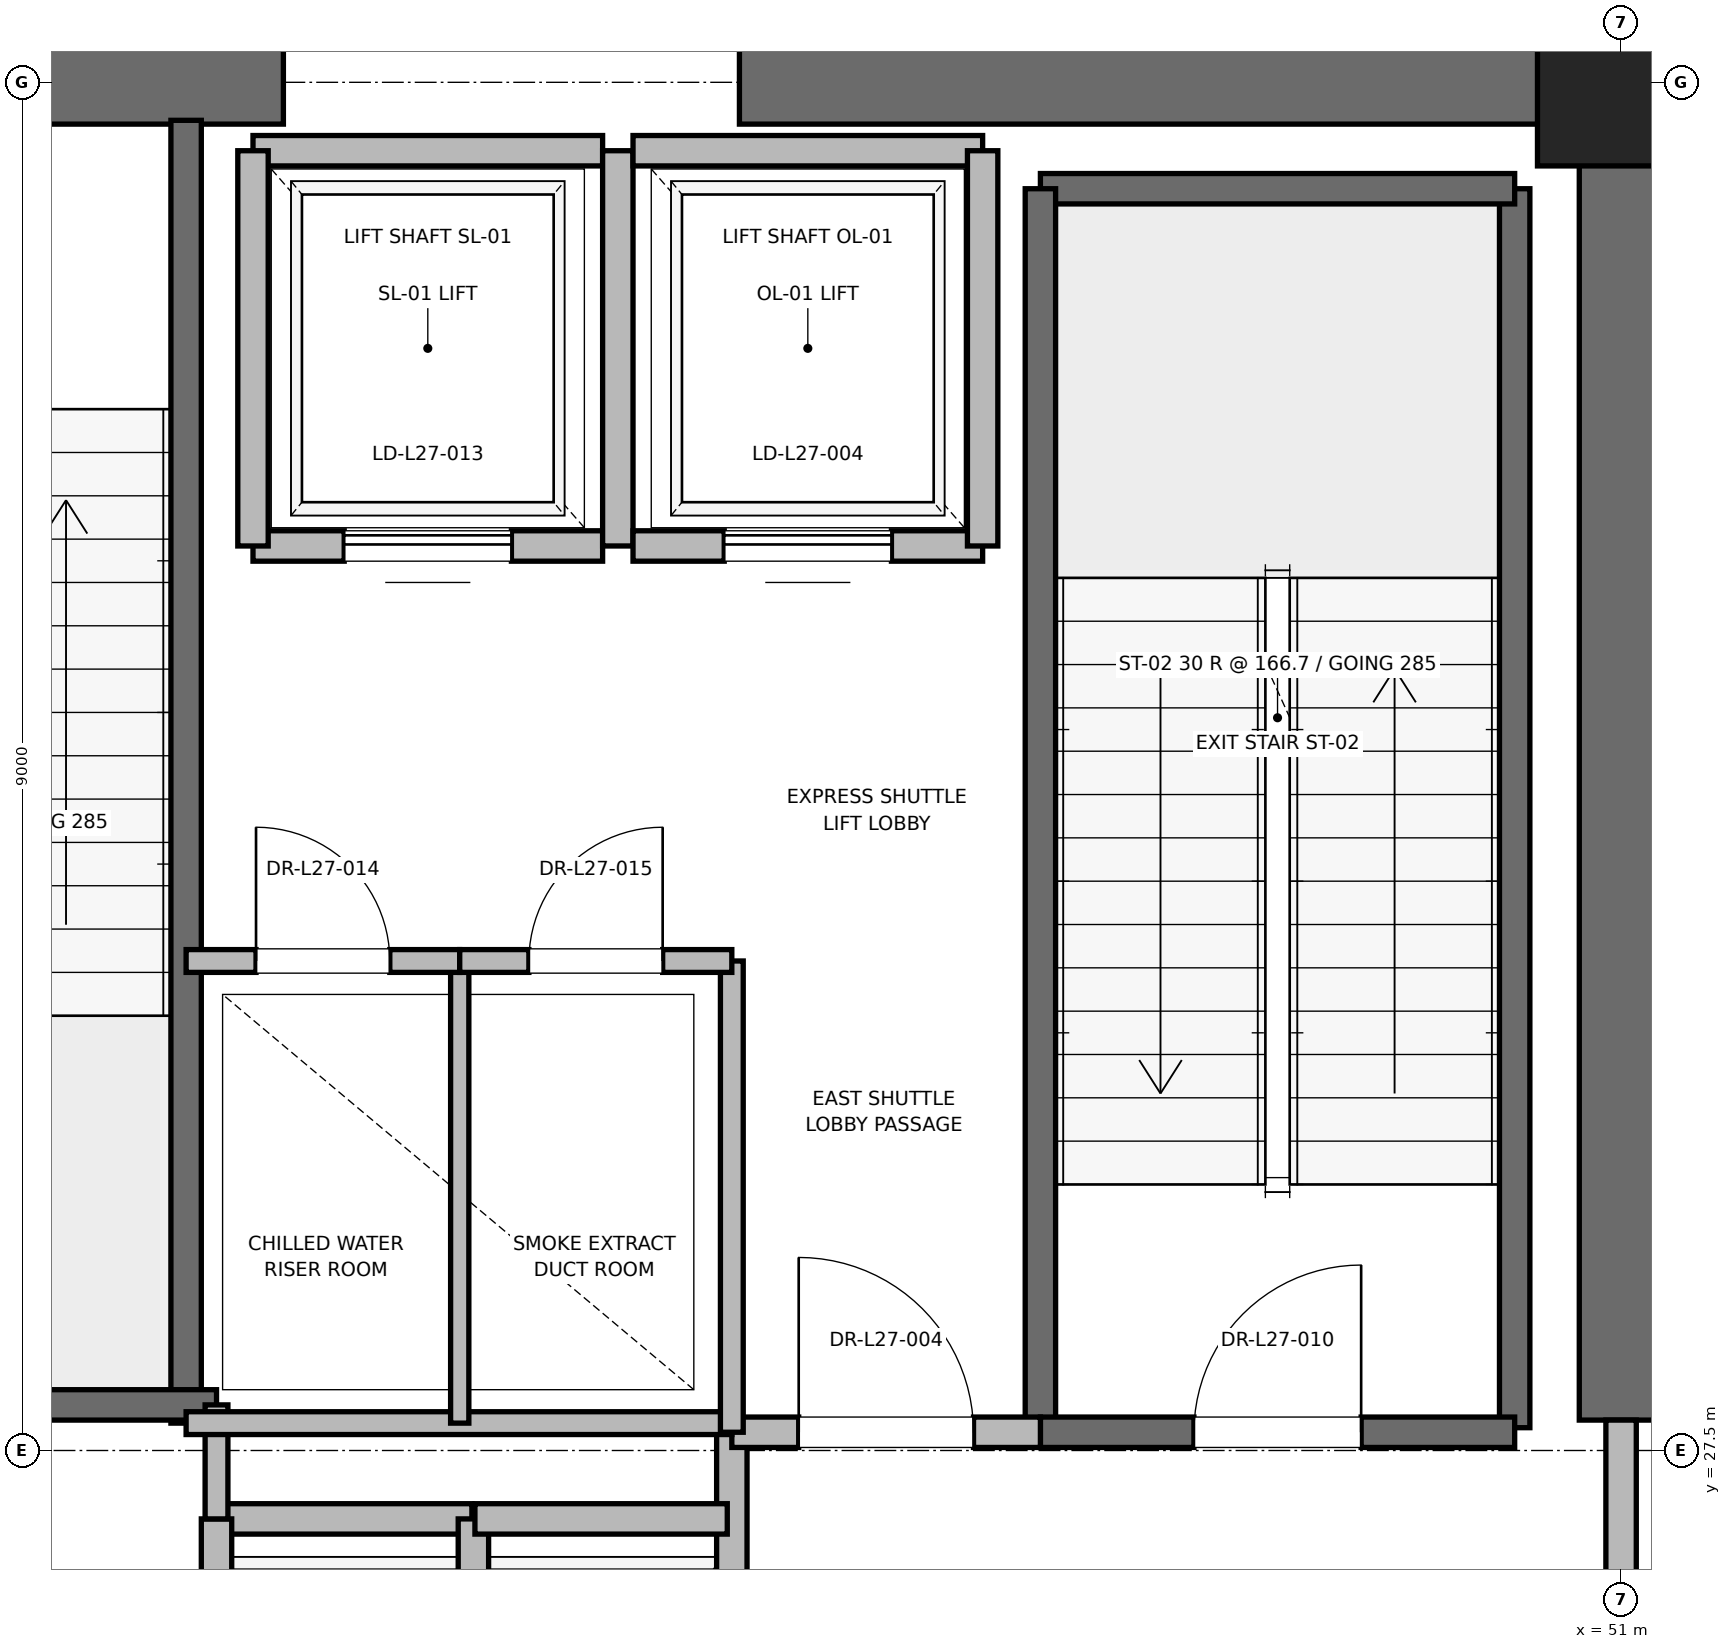
"""IFC4 building model, lengths in metres.
Left out: names, types, materials, properties, quantities, classifications, styles, units other than length and angle.
Written with IfcOpenShell. Run it as: python <this file> out.ifc"""

import sys

from ifc_helpers import new_model, si_unit, direction, frame, frame_2d, origin, origin_2d, place, context, subcontext, project, spatial, rectangle, extrude, element, fill, save


model = new_model("IFC4")
c1 = context("Model", 3, precision=1e-05, world=origin(), true_north=direction((0.0, 1.0)))
c2 = subcontext(c1, "Body", "Model", "MODEL_VIEW")
j1 = project(units=[si_unit("LENGTHUNIT", "METRE"), si_unit("PLANEANGLEUNIT", "RADIAN")], contexts=[c1])
p1 = place(None, origin())
s1 = spatial("IfcSite", under=j1, at=p1, CompositionType="ELEMENT")
p2 = place(p1, origin())
s2 = spatial("IfcBuilding", under=s1, at=p2, CompositionType="ELEMENT")
p3 = place(p2, frame((0.0, 0.0, 118.4)))
s3 = spatial("IfcBuildingStorey", under=s2, at=p3, CompositionType="ELEMENT", Elevation=118.4)
p4 = place(p3, frame((51.0, 36.5, 0.0), z_axis=(0.0, 0.0, 1.0), x_axis=(1.0, 0.0, 0.0)))
e1 = element("IfcColumn", 1, at=p4, inside=s3, PredefinedType="PILASTER", context=c2, shape_type="SweptSolid", body=[
    extrude(rectangle(XDim=1.1, YDim=1.1, at=origin_2d()), origin(), (0.0, 0.0, 1.0), 5.0),
])
p5 = place(p3, frame((37.8, 36.5, 0.0), z_axis=(0.0, 0.0, 1.0), x_axis=(1.0, 0.0, 0.0)))
e2 = element("IfcWall", 2, at=p5, inside=s3, PredefinedType="SHEAR", context=c2, shape_type="SweptSolid", body=[
    extrude(rectangle(XDim=4.4, YDim=0.55, at=frame_2d((2.2, 0.0))), origin(), (0.0, 0.0, 1.0), 4.7),
])
p6 = place(p5, frame((1.65, 0.0, 0.0)))
e3 = element("IfcOpeningElement", 3, at=p6, cuts=e2, PredefinedType="OPENING", context=c2, shape_type="SweptSolid", body=[
    extrude(rectangle(XDim=1.1, YDim=2.15, at=frame_2d((0.55, 1.075))), frame((0.0, 0.275, 0.0), z_axis=(0.0, -1.0, 0.0), x_axis=(1.0, 0.0, 0.0)), (0.0, 0.0, 1.0), 0.55),
])
p7 = place(p3, frame((45.2, 36.5, 0.0), z_axis=(0.0, 0.0, 1.0), x_axis=(1.0, 0.0, 0.0)))
e4 = element("IfcWall", 4, at=p7, inside=s3, PredefinedType="SHEAR", context=c2, shape_type="SweptSolid", body=[
    extrude(rectangle(XDim=5.8, YDim=0.55, at=frame_2d((2.9, 0.0))), origin(), (0.0, 0.0, 1.0), 4.7),
])
p8 = place(p3, frame((51.0, 27.7, 0.0), z_axis=(0.0, 0.0, 1.0), x_axis=(0.0, 1.0, 0.0)))
e5 = element("IfcWall", 5, at=p8, inside=s3, PredefinedType="SHEAR", context=c2, shape_type="SweptSolid", body=[
    extrude(rectangle(XDim=8.8, YDim=0.55, at=frame_2d((4.4, 0.0))), origin(), (0.0, 0.0, 1.0), 4.7),
])
p9 = place(p3, frame((50.3, 27.65, 0.0), z_axis=(0.0, 0.0, 1.0), x_axis=(0.0, 1.0, 0.0)))
e6 = element("IfcWall", 6, at=p9, inside=s3, PredefinedType="SOLIDWALL", context=c2, shape_type="SweptSolid", body=[
    extrude(rectangle(XDim=8.15, YDim=0.2, at=frame_2d((4.075, 0.0))), origin(), (0.0, 0.0, 1.0), 4.7),
])
p10 = place(p3, frame((47.18, 35.8, 0.0), z_axis=(0.0, 0.0, 1.0), x_axis=(1.0, 0.0, 0.0)))
e7 = element("IfcWall", 7, at=p10, inside=s3, PredefinedType="SOLIDWALL", context=c2, shape_type="SweptSolid", body=[
    extrude(rectangle(XDim=3.12, YDim=0.2, at=frame_2d((1.56, 0.0))), origin(), (0.0, 0.0, 1.0), 4.7),
])
p11 = place(p3, frame((47.18, 27.62, 0.0), z_axis=(0.0, 0.0, 1.0), x_axis=(0.0, 1.0, 0.0)))
e8 = element("IfcWall", 8, at=p11, inside=s3, PredefinedType="SOLIDWALL", context=c2, shape_type="SweptSolid", body=[
    extrude(rectangle(XDim=8.18, YDim=0.2, at=frame_2d((4.09, 0.0))), origin(), (0.0, 0.0, 1.0), 4.7),
])
p12 = place(p3, frame((47.18, 27.62, 0.0), z_axis=(0.0, 0.0, 1.0), x_axis=(1.0, 0.0, 0.0)))
e9 = element("IfcWall", 9, at=p12, inside=s3, PredefinedType="SOLIDWALL", context=c2, shape_type="SweptSolid", body=[
    extrude(rectangle(XDim=3.12, YDim=0.2, at=frame_2d((1.56, 0.0))), origin(), (0.0, 0.0, 1.0), 4.7),
])
p13 = place(p12, frame((1.01, 0.0, 0.0)))
e10 = element("IfcOpeningElement", 10, at=p13, cuts=e9, PredefinedType="OPENING", context=c2, shape_type="SweptSolid", body=[
    extrude(rectangle(XDim=1.1, YDim=2.15, at=frame_2d((0.55, 1.075))), frame((0.0, 0.1, 0.0), z_axis=(0.0, -1.0, 0.0), x_axis=(1.0, 0.0, 0.0)), (0.0, 0.0, 1.0), 0.2),
])
p14 = place(p3, frame((41.56, 27.68, 0.0), z_axis=(0.0, 0.0, 1.0), x_axis=(0.0, 1.0, 0.0)))
e11 = element("IfcWall", 11, at=p14, inside=s3, PredefinedType="SOLIDWALL", context=c2, shape_type="SweptSolid", body=[
    extrude(rectangle(XDim=8.57, YDim=0.2, at=frame_2d((4.285, 0.0))), origin(), (0.0, 0.0, 1.0), 4.7),
])
p15 = place(p3, frame((38.44, 27.8, 0.0), z_axis=(0.0, 0.0, 1.0), x_axis=(1.0, 0.0, 0.0)))
e12 = element("IfcWall", 12, at=p15, inside=s3, PredefinedType="SOLIDWALL", context=c2, shape_type="SweptSolid", body=[
    extrude(rectangle(XDim=3.32, YDim=0.2, at=frame_2d((1.66, 0.0))), origin(), (0.0, 0.0, 1.0), 4.7),
])
p16 = place(p3, frame((45.15, 24.25, 0.0), z_axis=(0.0, 0.0, 1.0), x_axis=(0.0, 1.0, 0.0)))
e13 = element("IfcWall", 13, at=p16, inside=s3, PredefinedType="PARTITIONING", context=c2, shape_type="SweptSolid", body=[
    extrude(rectangle(XDim=3.37, YDim=0.2, at=frame_2d((1.685, 0.0))), origin(), (0.0, 0.0, 1.0), 4.7),
])
p17 = place(p3, frame((45.15, 27.62, 0.0), z_axis=(0.0, 0.0, 1.0), x_axis=(1.0, 0.0, 0.0)))
e14 = element("IfcWall", 14, at=p17, inside=s3, PredefinedType="PARTITIONING", context=c2, shape_type="SweptSolid", body=[
    extrude(rectangle(XDim=2.03, YDim=0.2, at=frame_2d((1.015, 0.0))), origin(), (0.0, 0.0, 1.0), 4.7),
])
p18 = place(p17, frame((0.44, 0.0, 0.0)))
e15 = element("IfcOpeningElement", 15, at=p18, cuts=e14, PredefinedType="OPENING", context=c2, shape_type="SweptSolid", body=[
    extrude(rectangle(XDim=1.15, YDim=2.2, at=frame_2d((0.575, 1.1))), frame((0.0, 0.1, 0.0), z_axis=(0.0, -1.0, 0.0), x_axis=(1.0, 0.0, 0.0)), (0.0, 0.0, 1.0), 0.2),
])
p19 = place(p3, frame((51.0, 24.3, 0.0), z_axis=(0.0, 0.0, 1.0), x_axis=(0.0, 1.0, 0.0)))
e16 = element("IfcWall", 16, at=p19, inside=s3, PredefinedType="PARTITIONING", context=c2, shape_type="SweptSolid", body=[
    extrude(rectangle(XDim=3.4, YDim=0.2, at=frame_2d((1.7, 0.0))), origin(), (0.0, 0.0, 1.0), 3.68),
])
p20 = place(p19, frame((1.125, 0.0, 0.0)))
e17 = element("IfcOpeningElement", 17, at=p20, cuts=e16, PredefinedType="OPENING", context=c2, shape_type="SweptSolid", body=[
    extrude(rectangle(XDim=1.15, YDim=2.2, at=frame_2d((0.575, 1.1))), frame((0.0, 0.1, 0.0), z_axis=(0.0, -1.0, 0.0), x_axis=(1.0, 0.0, 0.0)), (0.0, 0.0, 1.0), 0.2),
])
p21 = place(p3, frame((43.44, 27.05, 0.0), z_axis=(0.0, 0.0, 1.0), x_axis=(-1.0, 0.0, 0.0)))
e18 = element("IfcWall", 18, at=p21, inside=s3, PredefinedType="SOLIDWALL", context=c2, shape_type="SweptSolid", body=[
    extrude(rectangle(XDim=1.68, YDim=0.2, at=frame_2d((0.84, 0.0))), origin(), (0.0, 0.0, 1.0), 4.7),
])
for number, where, z_axis, x_axis in (
    (19, (41.76, 27.05, 0.0), (0.0, 0.0, 1.0), (0.0, -1.0, 0.0)),
    (20, (43.45, 24.45, 0.0), (0.0, 0.0, 1.0), (0.0, 1.0, 0.0)),
):
    element("IfcWall", number, at=place(p3, frame(where, z_axis=z_axis, x_axis=x_axis)), inside=s3, PredefinedType="SOLIDWALL", context=c2, shape_type="SweptSolid", body=[
        extrude(rectangle(XDim=2.6, YDim=0.2, at=frame_2d((1.3, 0.0))), origin(), (0.0, 0.0, 1.0), 4.7),
    ])
p22 = place(p3, frame((45.12, 27.05, 0.0), z_axis=(0.0, 0.0, 1.0), x_axis=(-1.0, 0.0, 0.0)))
e21 = element("IfcWall", 21, at=p22, inside=s3, PredefinedType="SOLIDWALL", context=c2, shape_type="SweptSolid", body=[
    extrude(rectangle(XDim=1.66, YDim=0.2, at=frame_2d((0.83, 0.0))), origin(), (0.0, 0.0, 1.0), 4.7),
])
p23 = place(p3, frame((42.0, 33.45, 0.0), z_axis=(0.0, 0.0, 1.0), x_axis=(1.0, 0.0, 0.0)))
e22 = element("IfcWall", 22, at=p23, inside=s3, PredefinedType="SOLIDWALL", context=c2, shape_type="SweptSolid", body=[
    extrude(rectangle(XDim=2.3, YDim=0.2, at=frame_2d((1.15, 0.0))), origin(), (0.0, 0.0, 1.0), 4.7),
])
p24 = place(p23, frame((0.6, 0.0, 0.0)))
e23 = element("IfcOpeningElement", 23, at=p24, cuts=e22, PredefinedType="OPENING", context=c2, shape_type="SweptSolid", body=[
    extrude(rectangle(XDim=1.1, YDim=2.2, at=frame_2d((0.55, 1.1))), frame((0.0, 0.1, 0.0), z_axis=(0.0, -1.0, 0.0), x_axis=(1.0, 0.0, 0.0)), (0.0, 0.0, 1.0), 0.2),
])
p25 = place(p3, frame((44.3, 36.05, 0.0), z_axis=(0.0, 0.0, 1.0), x_axis=(-1.0, 0.0, 0.0)))
e24 = element("IfcWall", 24, at=p25, inside=s3, PredefinedType="SOLIDWALL", context=c2, shape_type="SweptSolid", body=[
    extrude(rectangle(XDim=2.3, YDim=0.2, at=frame_2d((1.15, 0.0))), origin(), (0.0, 0.0, 1.0), 3.68),
])
for number, where, z_axis, x_axis in (
    (25, (42.0, 36.05, 0.0), (0.0, 0.0, 1.0), (0.0, -1.0, 0.0)),
    (26, (44.4, 33.45, 0.0), (0.0, 0.0, 1.0), (0.0, 1.0, 0.0)),
):
    element("IfcWall", number, at=place(p3, frame(where, z_axis=z_axis, x_axis=x_axis)), inside=s3, PredefinedType="SOLIDWALL", context=c2, shape_type="SweptSolid", body=[
        extrude(rectangle(XDim=2.6, YDim=0.2, at=frame_2d((1.3, 0.0))), origin(), (0.0, 0.0, 1.0), 3.68),
    ])
p26 = place(p3, frame((44.5, 33.45, 0.0), z_axis=(0.0, 0.0, 1.0), x_axis=(1.0, 0.0, 0.0)))
e27 = element("IfcWall", 27, at=p26, inside=s3, PredefinedType="SOLIDWALL", context=c2, shape_type="SweptSolid", body=[
    extrude(rectangle(XDim=2.3, YDim=0.2, at=frame_2d((1.15, 0.0))), origin(), (0.0, 0.0, 1.0), 4.7),
])
p27 = place(p26, frame((0.6, 0.0, 0.0)))
e28 = element("IfcOpeningElement", 28, at=p27, cuts=e27, PredefinedType="OPENING", context=c2, shape_type="SweptSolid", body=[
    extrude(rectangle(XDim=1.1, YDim=2.2, at=frame_2d((0.55, 1.1))), frame((0.0, 0.1, 0.0), z_axis=(0.0, -1.0, 0.0), x_axis=(1.0, 0.0, 0.0)), (0.0, 0.0, 1.0), 0.2),
])
p28 = place(p3, frame((46.8, 36.05, 0.0), z_axis=(0.0, 0.0, 1.0), x_axis=(-1.0, 0.0, 0.0)))
e29 = element("IfcWall", 29, at=p28, inside=s3, PredefinedType="SOLIDWALL", context=c2, shape_type="SweptSolid", body=[
    extrude(rectangle(XDim=2.3, YDim=0.2, at=frame_2d((1.15, 0.0))), origin(), (0.0, 0.0, 1.0), 3.68),
])
p29 = place(p3, frame((46.8, 33.45, 0.0), z_axis=(0.0, 0.0, 1.0), x_axis=(0.0, 1.0, 0.0)))
e30 = element("IfcWall", 30, at=p29, inside=s3, PredefinedType="SOLIDWALL", context=c2, shape_type="SweptSolid", body=[
    extrude(rectangle(XDim=2.6, YDim=0.2, at=frame_2d((1.3, 0.0))), origin(), (0.0, 0.0, 1.0), 4.7),
])
p30 = place(p3, frame((41.76, 27.05, 0.0), z_axis=(0.0, 0.0, 1.0), x_axis=(0.0, 1.0, 0.0)))
e31 = element("IfcWall", 31, at=p30, inside=s3, PredefinedType="PARTITIONING", context=c2, shape_type="SweptSolid", body=[
    extrude(rectangle(XDim=0.75, YDim=0.15, at=frame_2d((0.375, 0.0))), origin(), (0.0, 0.0, 1.0), 2.85),
])
p31 = place(p3, frame((41.56, 27.68, 0.0), z_axis=(0.0, 0.0, 1.0), x_axis=(1.0, 0.0, 0.0)))
e32 = element("IfcWall", 32, at=p31, inside=s3, PredefinedType="PARTITIONING", context=c2, shape_type="SweptSolid", body=[
    extrude(rectangle(XDim=3.59, YDim=0.15, at=frame_2d((1.795, 0.0))), origin(), (0.0, 0.0, 1.0), 2.85),
])
p32 = place(p3, frame((45.15, 27.62, 0.0), z_axis=(0.0, 0.0, 1.0), x_axis=(0.0, 1.0, 0.0)))
e33 = element("IfcWall", 33, at=p32, inside=s3, PredefinedType="PARTITIONING", context=c2, shape_type="SweptSolid", body=[
    extrude(rectangle(XDim=3.1, YDim=0.15, at=frame_2d((1.55, 0.0))), origin(), (0.0, 0.0, 1.0), 2.85),
])
p33 = place(p3, frame((43.36, 27.68, 0.0), z_axis=(0.0, 0.0, 1.0), x_axis=(0.0, 1.0, 0.0)))
e34 = element("IfcWall", 34, at=p33, inside=s3, PredefinedType="PARTITIONING", context=c2, shape_type="SweptSolid", body=[
    extrude(rectangle(XDim=3.04, YDim=0.12, at=frame_2d((1.52, 0.0))), origin(), (0.0, 0.0, 1.0), 2.85),
])
p34 = place(p3, frame((41.56, 30.72, 0.0), z_axis=(0.0, 0.0, 1.0), x_axis=(1.0, 0.0, 0.0)))
e35 = element("IfcWall", 35, at=p34, inside=s3, PredefinedType="PARTITIONING", context=c2, shape_type="SweptSolid", body=[
    extrude(rectangle(XDim=1.8, YDim=0.15, at=frame_2d((0.9, 0.0))), origin(), (0.0, 0.0, 1.0), 2.85),
])
p35 = place(p34, frame((0.46, 0.0, 0.0)))
e36 = element("IfcOpeningElement", 36, at=p35, cuts=e35, PredefinedType="OPENING", context=c2, shape_type="SweptSolid", body=[
    extrude(rectangle(XDim=0.88, YDim=2.1, at=frame_2d((0.44, 1.05))), frame((0.0, 0.075, 0.0), z_axis=(0.0, -1.0, 0.0), x_axis=(1.0, 0.0, 0.0)), (0.0, 0.0, 1.0), 0.15),
])
p36 = place(p3, frame((43.36, 30.72, 0.0), z_axis=(0.0, 0.0, 1.0), x_axis=(1.0, 0.0, 0.0)))
e37 = element("IfcWall", 37, at=p36, inside=s3, PredefinedType="PARTITIONING", context=c2, shape_type="SweptSolid", body=[
    extrude(rectangle(XDim=1.79, YDim=0.15, at=frame_2d((0.895, 0.0))), origin(), (0.0, 0.0, 1.0), 2.85),
])
p37 = place(p36, frame((0.455, 0.0, 0.0)))
e38 = element("IfcOpeningElement", 38, at=p37, cuts=e37, PredefinedType="OPENING", context=c2, shape_type="SweptSolid", body=[
    extrude(rectangle(XDim=0.88, YDim=2.1, at=frame_2d((0.44, 1.05))), frame((0.0, 0.075, 0.0), z_axis=(0.0, -1.0, 0.0), x_axis=(1.0, 0.0, 0.0)), (0.0, 0.0, 1.0), 0.15),
])
p38 = place(p13, origin())
e39 = element("IfcDoor", 39, at=p38, inside=s3, OperationType="SINGLE_SWING_RIGHT", PredefinedType="DOOR", context=c2, shape_type="SweptSolid", body=[
    extrude(rectangle(XDim=1.1, YDim=2.15, at=frame_2d((0.55, 1.075))), frame((0.0, 0.025, 0.0), z_axis=(0.0, -1.0, 0.0), x_axis=(1.0, 0.0, 0.0)), (0.0, 0.0, 1.0), 0.05),
])
fill(e10, e39)
p39 = place(p18, origin())
e40 = element("IfcDoor", 40, at=p39, inside=s3, OperationType="SINGLE_SWING_LEFT", PredefinedType="DOOR", context=c2, shape_type="SweptSolid", body=[
    extrude(rectangle(XDim=1.15, YDim=2.2, at=frame_2d((0.575, 1.1))), frame((0.0, 0.025, 0.0), z_axis=(0.0, -1.0, 0.0), x_axis=(1.0, 0.0, 0.0)), (0.0, 0.0, 1.0), 0.05),
])
fill(e15, e40)
p40 = place(p24, origin())
e41 = element("IfcDoor", 41, at=p40, inside=s3, OperationType="SLIDING_TO_RIGHT", PredefinedType="DOOR", context=c2, shape_type="SweptSolid", body=[
    extrude(rectangle(XDim=1.1, YDim=2.2, at=frame_2d((0.55, 1.1))), frame((0.0, 0.025, 0.0), z_axis=(0.0, -1.0, 0.0), x_axis=(1.0, 0.0, 0.0)), (0.0, 0.0, 1.0), 0.05),
])
fill(e23, e41)
p41 = place(p27, origin())
e42 = element("IfcDoor", 42, at=p41, inside=s3, OperationType="SLIDING_TO_RIGHT", PredefinedType="DOOR", context=c2, shape_type="SweptSolid", body=[
    extrude(rectangle(XDim=1.1, YDim=2.2, at=frame_2d((0.55, 1.1))), frame((0.0, 0.025, 0.0), z_axis=(0.0, -1.0, 0.0), x_axis=(1.0, 0.0, 0.0)), (0.0, 0.0, 1.0), 0.05),
])
fill(e28, e42)
p42 = place(p35, origin())
e43 = element("IfcDoor", 43, at=p42, inside=s3, OperationType="SINGLE_SWING_LEFT", PredefinedType="DOOR", context=c2, shape_type="SweptSolid", body=[
    extrude(rectangle(XDim=0.88, YDim=2.1, at=frame_2d((0.44, 1.05))), frame((0.0, 0.025, 0.0), z_axis=(0.0, -1.0, 0.0), x_axis=(1.0, 0.0, 0.0)), (0.0, 0.0, 1.0), 0.05),
])
fill(e36, e43)
p43 = place(p37, origin())
e44 = element("IfcDoor", 44, at=p43, inside=s3, OperationType="SINGLE_SWING_RIGHT", PredefinedType="DOOR", context=c2, shape_type="SweptSolid", body=[
    extrude(rectangle(XDim=0.88, YDim=2.1, at=frame_2d((0.44, 1.05))), frame((0.0, 0.025, 0.0), z_axis=(0.0, -1.0, 0.0), x_axis=(1.0, 0.0, 0.0)), (0.0, 0.0, 1.0), 0.05),
])
fill(e38, e44)
save(model, sys.argv[1])
